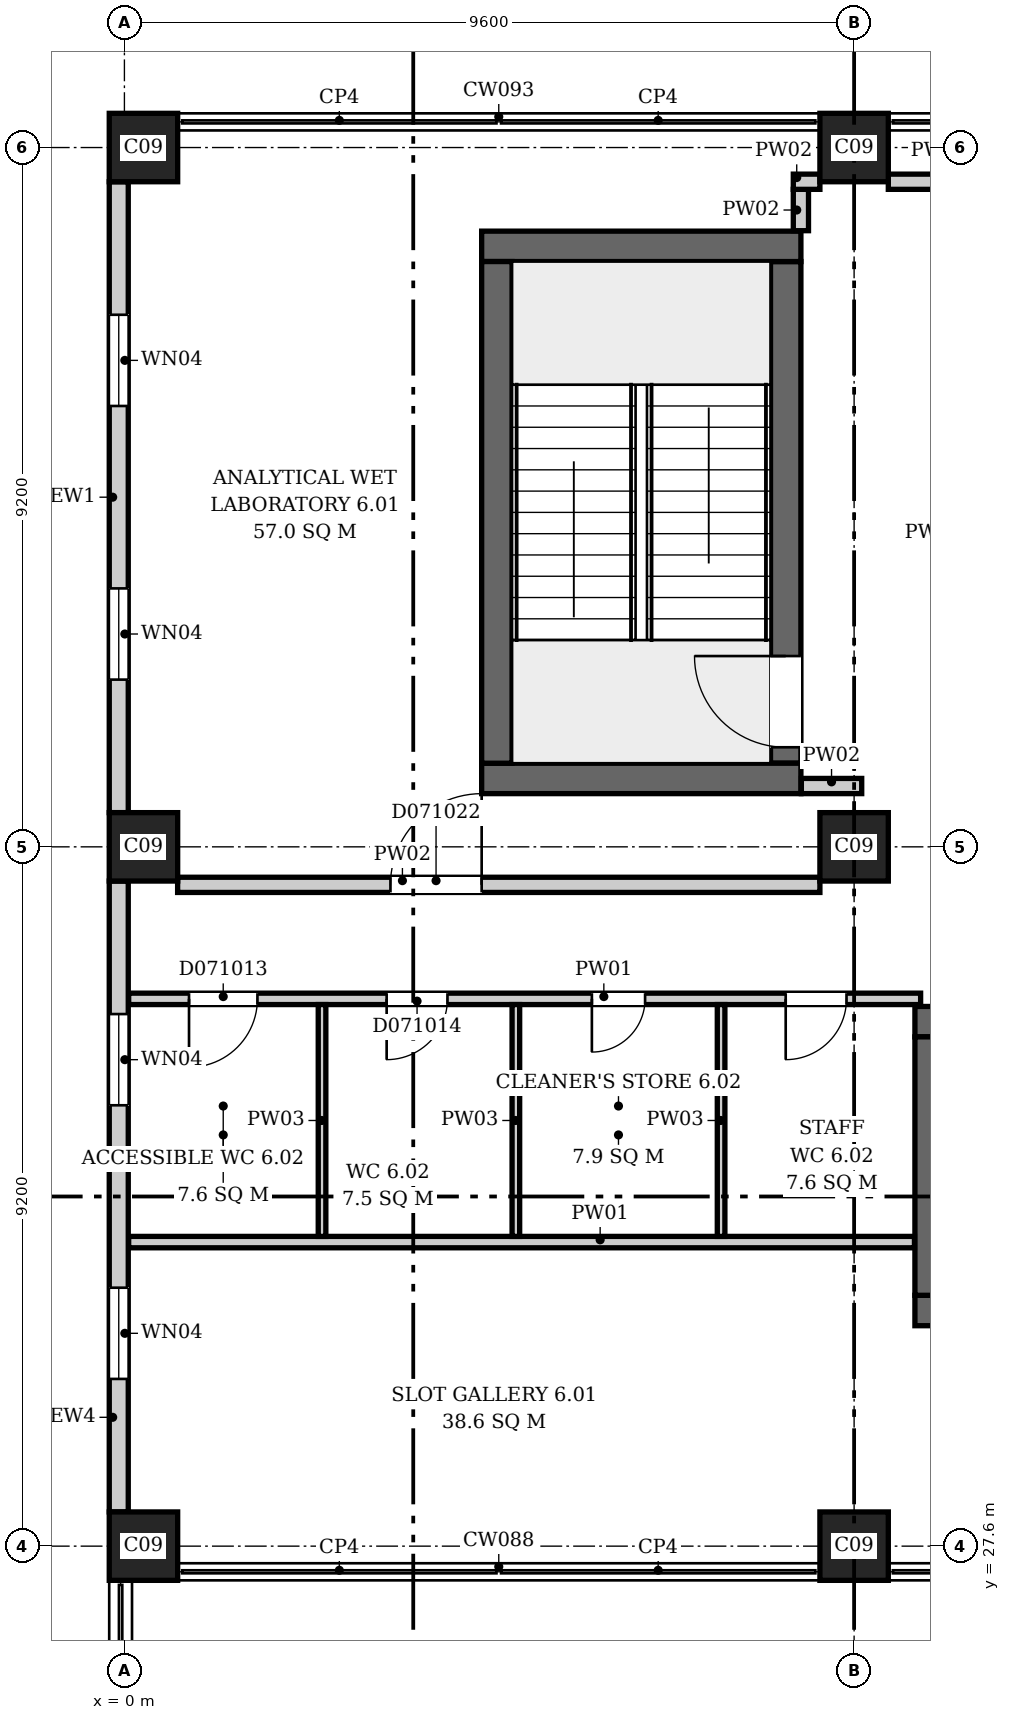
"""IFC4 building model, lengths in metres.
Left out: names, types, materials, properties, quantities, classifications, styles, units other than length and angle.
Written with IfcOpenShell. Run it as: python <this file> out.ifc"""

import sys

from ifc_helpers import new_model, si_unit, direction, frame, frame_2d, origin, origin_2d, place, context, subcontext, project, spatial, rectangle, extrude, element, fill, save


model = new_model("IFC4")
c1 = context("Model", 3, precision=1e-05, world=origin(), true_north=direction((0.0, 1.0)))
c2 = subcontext(c1, "Body", "Model", "MODEL_VIEW")
j1 = project(units=[si_unit("LENGTHUNIT", "METRE"), si_unit("PLANEANGLEUNIT", "RADIAN")], contexts=[c1])
p1 = place(None, origin())
s1 = spatial("IfcSite", under=j1, at=p1, CompositionType="ELEMENT")
p2 = place(p1, origin())
s2 = spatial("IfcBuilding", under=s1, at=p2, CompositionType="ELEMENT")
p3 = place(p2, frame((0.0, 0.0, 36.1)))
s3 = spatial("IfcBuildingStorey", under=s2, at=p3, CompositionType="ELEMENT", Elevation=36.1)
for number, where, z_axis, x_axis in (
    (1, (4.7, 37.7, 0.0), (0.0, 0.0, 1.0), (1.0, 0.0, 0.0)),
    (2, (4.7, 44.7, 0.0), (0.0, 0.0, 1.0), (1.0, 0.0, 0.0)),
):
    element("IfcWall", number, at=place(p3, frame(where, z_axis=z_axis, x_axis=x_axis)), inside=s3, PredefinedType="SHEAR", context=c2, shape_type="SweptSolid", body=[
        extrude(rectangle(XDim=4.2, YDim=0.4, at=frame_2d((2.1, 0.0))), origin(), (0.0, 0.0, 1.0), 4.2),
    ])
p4 = place(p3, frame((4.9, 37.9, 0.0), z_axis=(0.0, 0.0, 1.0), x_axis=(0.0, 1.0, 0.0)))
e3 = element("IfcWall", 3, at=p4, inside=s3, PredefinedType="SHEAR", context=c2, shape_type="SweptSolid", body=[
    extrude(rectangle(XDim=6.6, YDim=0.4, at=frame_2d((3.3, 0.0))), origin(), (0.0, 0.0, 1.0), 4.2),
])
p5 = place(p3, frame((8.7, 37.9, 0.0), z_axis=(0.0, 0.0, 1.0), x_axis=(0.0, 1.0, 0.0)))
e4 = element("IfcWall", 4, at=p5, inside=s3, PredefinedType="SHEAR", context=c2, shape_type="SweptSolid", body=[
    extrude(rectangle(XDim=6.6, YDim=0.4, at=frame_2d((3.3, 0.0))), origin(), (0.0, 0.0, 1.0), 4.2),
])
p6 = place(p5, frame((0.21, 0.0, 0.0)))
e5 = element("IfcOpeningElement", 5, at=p6, cuts=e4, PredefinedType="OPENING", context=c2, shape_type="SweptSolid", body=[
    extrude(rectangle(XDim=1.2, YDim=2.1, at=frame_2d((0.6, 1.05))), frame((0.0, 0.21, 0.0), z_axis=(0.0, -1.0, 0.0), x_axis=(1.0, 0.0, 0.0)), (0.0, 0.0, 1.0), 0.42),
])
p7 = place(p3, frame((10.4, 30.7, 0.0), z_axis=(0.0, 0.0, 1.0), x_axis=(1.0, 0.0, 0.0)))
e6 = element("IfcWall", 6, at=p7, inside=s3, PredefinedType="SHEAR", context=c2, shape_type="SweptSolid", body=[
    extrude(rectangle(XDim=3.1, YDim=0.4, at=frame_2d((1.55, 0.0))), origin(), (0.0, 0.0, 1.0), 4.2),
])
p8 = place(p7, frame((0.95, 0.0, 0.0)))
e7 = element("IfcOpeningElement", 7, at=p8, cuts=e6, PredefinedType="OPENING", context=c2, shape_type="SweptSolid", body=[
    extrude(rectangle(XDim=1.2, YDim=2.1, at=frame_2d((0.6, 1.05))), frame((0.0, 0.21, 0.0), z_axis=(0.0, -1.0, 0.0), x_axis=(1.0, 0.0, 0.0)), (0.0, 0.0, 1.0), 0.42),
])
p9 = place(p3, frame((10.4, 34.5, 0.0), z_axis=(0.0, 0.0, 1.0), x_axis=(1.0, 0.0, 0.0)))
e8 = element("IfcWall", 8, at=p9, inside=s3, PredefinedType="SHEAR", context=c2, shape_type="SweptSolid", body=[
    extrude(rectangle(XDim=3.1, YDim=0.4, at=frame_2d((1.55, 0.0))), origin(), (0.0, 0.0, 1.0), 4.2),
])
p10 = place(p3, frame((10.6, 30.9, 0.0), z_axis=(0.0, 0.0, 1.0), x_axis=(0.0, 1.0, 0.0)))
e9 = element("IfcWall", 9, at=p10, inside=s3, PredefinedType="SHEAR", context=c2, shape_type="SweptSolid", body=[
    extrude(rectangle(XDim=3.4, YDim=0.4, at=frame_2d((1.7, 0.0))), origin(), (0.0, 0.0, 1.0), 4.2),
])
for number, where, z_axis, x_axis in (
    (10, (0.25, 27.6, 0.0), (0.0, 0.0, 1.0), (1.0, 0.0, 0.0)),
    (11, (9.6, 27.6, 0.0), (0.0, 0.0, 1.0), (1.0, 0.0, 0.0)),
    (12, (0.25, 36.8, 0.0), (0.0, 0.0, 1.0), (1.0, 0.0, 0.0)),
    (13, (9.6, 36.8, 0.0), (0.0, 0.0, 1.0), (1.0, 0.0, 0.0)),
    (14, (0.25, 46.0, 0.0), (0.0, 0.0, 1.0), (1.0, 0.0, 0.0)),
    (15, (9.6, 46.0, 0.0), (0.0, 0.0, 1.0), (1.0, 0.0, 0.0)),
):
    element("IfcColumn", number, at=place(p3, frame(where, z_axis=z_axis, x_axis=x_axis)), inside=s3, PredefinedType="COLUMN", context=c2, shape_type="SweptSolid", body=[
        extrude(rectangle(XDim=0.9, YDim=0.9, at=origin_2d()), origin(), (0.0, 0.0, 1.0), 4.2),
    ])
p11 = place(p3, frame((-0.074, 36.35, 0.0), z_axis=(0.0, 0.0, 1.0), x_axis=(0.0, -1.0, 0.0)))
e16 = element("IfcWall", 16, at=p11, inside=s3, PredefinedType="ELEMENTEDWALL", context=c2, shape_type="SweptSolid", body=[
    extrude(rectangle(XDim=8.3, YDim=0.25, at=frame_2d((4.15, 0.0))), origin(), (0.0, 0.0, 1.0), 3.9),
])
p12 = place(p11, frame((5.35, 0.0, 0.9)))
e17 = element("IfcOpeningElement", 17, at=p12, cuts=e16, PredefinedType="OPENING", context=c2, shape_type="SweptSolid", body=[
    extrude(rectangle(XDim=1.2, YDim=2.6, at=frame_2d((0.6, 1.3))), frame((0.0, 0.135, 0.0), z_axis=(0.0, -1.0, 0.0), x_axis=(1.0, 0.0, 0.0)), (0.0, 0.0, 1.0), 0.27),
])
p13 = place(p11, frame((1.75, 0.0, 0.9)))
e18 = element("IfcOpeningElement", 18, at=p13, cuts=e16, PredefinedType="OPENING", context=c2, shape_type="SweptSolid", body=[
    extrude(rectangle(XDim=1.2, YDim=2.6, at=frame_2d((0.6, 1.3))), frame((0.0, 0.135, 0.0), z_axis=(0.0, -1.0, 0.0), x_axis=(1.0, 0.0, 0.0)), (0.0, 0.0, 1.0), 0.27),
])
p14 = place(p3, frame((-0.074, 45.55, 0.0), z_axis=(0.0, 0.0, 1.0), x_axis=(0.0, -1.0, 0.0)))
e19 = element("IfcWall", 19, at=p14, inside=s3, PredefinedType="ELEMENTEDWALL", context=c2, shape_type="SweptSolid", body=[
    extrude(rectangle(XDim=8.3, YDim=0.25, at=frame_2d((4.15, 0.0))), origin(), (0.0, 0.0, 1.0), 3.9),
])
p15 = place(p14, frame((5.35, 0.0, 0.9)))
e20 = element("IfcOpeningElement", 20, at=p15, cuts=e19, PredefinedType="OPENING", context=c2, shape_type="SweptSolid", body=[
    extrude(rectangle(XDim=1.2, YDim=2.6, at=frame_2d((0.6, 1.3))), frame((0.0, 0.135, 0.0), z_axis=(0.0, -1.0, 0.0), x_axis=(1.0, 0.0, 0.0)), (0.0, 0.0, 1.0), 0.27),
])
p16 = place(p14, frame((1.75, 0.0, 0.9)))
e21 = element("IfcOpeningElement", 21, at=p16, cuts=e19, PredefinedType="OPENING", context=c2, shape_type="SweptSolid", body=[
    extrude(rectangle(XDim=1.2, YDim=2.6, at=frame_2d((0.6, 1.3))), frame((0.0, 0.135, 0.0), z_axis=(0.0, -1.0, 0.0), x_axis=(1.0, 0.0, 0.0)), (0.0, 0.0, 1.0), 0.27),
])
p17 = place(p3, frame((0.056, 31.6, 0.0), z_axis=(0.0, 0.0, 1.0), x_axis=(1.0, 0.0, 0.0)))
e22 = element("IfcWall", 22, at=p17, inside=s3, PredefinedType="PARTITIONING", context=c2, shape_type="SweptSolid", body=[
    extrude(rectangle(XDim=10.338, YDim=0.15, at=frame_2d((5.169, 0.0))), origin(), (0.0, 0.0, 1.0), 3.9),
])
p18 = place(p3, frame((0.056, 34.8, 0.0), z_axis=(0.0, 0.0, 1.0), x_axis=(1.0, 0.0, 0.0)))
e23 = element("IfcWall", 23, at=p18, inside=s3, PredefinedType="PARTITIONING", context=c2, shape_type="SweptSolid", body=[
    extrude(rectangle(XDim=10.419, YDim=0.15, at=frame_2d((5.209, 0.0))), origin(), (0.0, 0.0, 1.0), 3.9),
])
p19 = place(p18, frame((0.794, 0.0, 0.0)))
e24 = element("IfcOpeningElement", 24, at=p19, cuts=e23, PredefinedType="OPENING", context=c2, shape_type="SweptSolid", body=[
    extrude(rectangle(XDim=0.9, YDim=2.1, at=frame_2d((0.45, 1.05))), frame((0.0, 0.085, 0.0), z_axis=(0.0, -1.0, 0.0), x_axis=(1.0, 0.0, 0.0)), (0.0, 0.0, 1.0), 0.17),
])
p20 = place(p18, frame((3.394, 0.0, 0.0)))
e25 = element("IfcOpeningElement", 25, at=p20, cuts=e23, PredefinedType="OPENING", context=c2, shape_type="SweptSolid", body=[
    extrude(rectangle(XDim=0.8, YDim=2.1, at=frame_2d((0.4, 1.05))), frame((0.0, 0.085, 0.0), z_axis=(0.0, -1.0, 0.0), x_axis=(1.0, 0.0, 0.0)), (0.0, 0.0, 1.0), 0.17),
])
p21 = place(p18, frame((6.094, 0.0, 0.0)))
e26 = element("IfcOpeningElement", 26, at=p21, cuts=e23, PredefinedType="OPENING", context=c2, shape_type="SweptSolid", body=[
    extrude(rectangle(XDim=0.7, YDim=2.1, at=frame_2d((0.35, 1.05))), frame((0.0, 0.085, 0.0), z_axis=(0.0, -1.0, 0.0), x_axis=(1.0, 0.0, 0.0)), (0.0, 0.0, 1.0), 0.17),
])
p22 = place(p18, frame((8.644, 0.0, 0.0)))
e27 = element("IfcOpeningElement", 27, at=p22, cuts=e23, PredefinedType="OPENING", context=c2, shape_type="SweptSolid", body=[
    extrude(rectangle(XDim=0.8, YDim=2.1, at=frame_2d((0.4, 1.05))), frame((0.0, 0.085, 0.0), z_axis=(0.0, -1.0, 0.0), x_axis=(1.0, 0.0, 0.0)), (0.0, 0.0, 1.0), 0.17),
])
p23 = place(p3, frame((0.7, 36.3, 0.0), z_axis=(0.0, 0.0, 1.0), x_axis=(1.0, 0.0, 0.0)))
e28 = element("IfcWall", 28, at=p23, inside=s3, PredefinedType="PARTITIONING", context=c2, shape_type="SweptSolid", body=[
    extrude(rectangle(XDim=8.45, YDim=0.2, at=frame_2d((4.225, 0.0))), origin(), (0.0, 0.0, 1.0), 3.9),
])
p24 = place(p23, frame((2.8, 0.0, 0.0)))
e29 = element("IfcOpeningElement", 29, at=p24, cuts=e28, PredefinedType="OPENING", context=c2, shape_type="SweptSolid", body=[
    extrude(rectangle(XDim=1.2, YDim=2.1, at=frame_2d((0.6, 1.05))), frame((0.0, 0.11, 0.0), z_axis=(0.0, -1.0, 0.0), x_axis=(1.0, 0.0, 0.0)), (0.0, 0.0, 1.0), 0.22),
])
for number, where, z_axis, x_axis in (
    (30, (2.6, 31.675, 0.0), (0.0, 0.0, 1.0), (0.0, 1.0, 0.0)),
    (31, (5.15, 31.675, 0.0), (0.0, 0.0, 1.0), (0.0, 1.0, 0.0)),
    (32, (7.85, 31.675, 0.0), (0.0, 0.0, 1.0), (0.0, 1.0, 0.0)),
):
    element("IfcWall", number, at=place(p3, frame(where, z_axis=z_axis, x_axis=x_axis)), inside=s3, PredefinedType="PARTITIONING", context=c2, shape_type="SweptSolid", body=[
        extrude(rectangle(XDim=3.05, YDim=0.1, at=frame_2d((1.525, 0.0))), origin(), (0.0, 0.0, 1.0), 3.9),
    ])
p25 = place(p3, frame((8.9, 44.906, 0.0), z_axis=(0.0, 0.0, 1.0), x_axis=(0.0, 1.0, 0.0)))
e33 = element("IfcWall", 33, at=p25, inside=s3, PredefinedType="PARTITIONING", context=c2, shape_type="SweptSolid", body=[
    extrude(rectangle(XDim=0.544, YDim=0.2, at=frame_2d((0.272, 0.0))), origin(), (0.0, 0.0, 1.0), 3.9),
])
p26 = place(p3, frame((8.8, 45.55, 0.0), z_axis=(0.0, 0.0, 1.0), x_axis=(1.0, 0.0, 0.0)))
e34 = element("IfcWall", 34, at=p26, inside=s3, PredefinedType="PARTITIONING", context=c2, shape_type="SweptSolid", body=[
    extrude(rectangle(XDim=0.35, YDim=0.2, at=frame_2d((0.175, 0.0))), origin(), (0.0, 0.0, 1.0), 3.9),
])
p27 = place(p3, frame((8.906, 37.6, 0.0), z_axis=(0.0, 0.0, 1.0), x_axis=(1.0, 0.0, 0.0)))
e35 = element("IfcWall", 35, at=p27, inside=s3, PredefinedType="PARTITIONING", context=c2, shape_type="SweptSolid", body=[
    extrude(rectangle(XDim=0.794, YDim=0.2, at=frame_2d((0.397, 0.0))), origin(), (0.0, 0.0, 1.0), 3.9),
])
p28 = place(p3, frame((10.05, 45.55, 0.0), z_axis=(0.0, 0.0, 1.0), x_axis=(1.0, 0.0, 0.0)))
e36 = element("IfcWall", 36, at=p28, inside=s3, PredefinedType="PARTITIONING", context=c2, shape_type="SweptSolid", body=[
    extrude(rectangle(XDim=1.35, YDim=0.2, at=frame_2d((0.675, 0.0))), origin(), (0.0, 0.0, 1.0), 3.9),
])
p29 = place(p12, origin())
e37 = element("IfcWindow", 37, at=p29, inside=s3, PartitioningType="SINGLE_PANEL", PredefinedType="WINDOW", context=c2, shape_type="SweptSolid", body=[
    extrude(rectangle(XDim=1.2, YDim=2.6, at=frame_2d((0.6, 1.3))), frame((0.0, 0.03, 0.0), z_axis=(0.0, -1.0, 0.0), x_axis=(1.0, 0.0, 0.0)), (0.0, 0.0, 1.0), 0.06),
])
fill(e17, e37)
p30 = place(p13, origin())
e38 = element("IfcWindow", 38, at=p30, inside=s3, PartitioningType="SINGLE_PANEL", PredefinedType="WINDOW", context=c2, shape_type="SweptSolid", body=[
    extrude(rectangle(XDim=1.2, YDim=2.6, at=frame_2d((0.6, 1.3))), frame((0.0, 0.03, 0.0), z_axis=(0.0, -1.0, 0.0), x_axis=(1.0, 0.0, 0.0)), (0.0, 0.0, 1.0), 0.06),
])
fill(e18, e38)
p31 = place(p15, origin())
e39 = element("IfcWindow", 39, at=p31, inside=s3, PartitioningType="SINGLE_PANEL", PredefinedType="WINDOW", context=c2, shape_type="SweptSolid", body=[
    extrude(rectangle(XDim=1.2, YDim=2.6, at=frame_2d((0.6, 1.3))), frame((0.0, 0.03, 0.0), z_axis=(0.0, -1.0, 0.0), x_axis=(1.0, 0.0, 0.0)), (0.0, 0.0, 1.0), 0.06),
])
fill(e20, e39)
p32 = place(p16, origin())
e40 = element("IfcWindow", 40, at=p32, inside=s3, PartitioningType="SINGLE_PANEL", PredefinedType="WINDOW", context=c2, shape_type="SweptSolid", body=[
    extrude(rectangle(XDim=1.2, YDim=2.6, at=frame_2d((0.6, 1.3))), frame((0.0, 0.03, 0.0), z_axis=(0.0, -1.0, 0.0), x_axis=(1.0, 0.0, 0.0)), (0.0, 0.0, 1.0), 0.06),
])
fill(e21, e40)
p33 = place(p6, origin())
e41 = element("IfcDoor", 41, at=p33, inside=s3, OperationType="SINGLE_SWING_RIGHT", PredefinedType="DOOR", context=c2, shape_type="SweptSolid", body=[
    extrude(rectangle(XDim=1.2, YDim=2.1, at=frame_2d((0.6, 1.05))), frame((0.0, 0.025, 0.0), z_axis=(0.0, -1.0, 0.0), x_axis=(1.0, 0.0, 0.0)), (0.0, 0.0, 1.0), 0.05),
])
fill(e5, e41)
p34 = place(p19, origin())
e42 = element("IfcDoor", 42, at=p34, inside=s3, OperationType="SINGLE_SWING_LEFT", PredefinedType="DOOR", context=c2, shape_type="SweptSolid", body=[
    extrude(rectangle(XDim=0.9, YDim=2.1, at=frame_2d((0.45, 1.05))), frame((0.0, 0.025, 0.0), z_axis=(0.0, -1.0, 0.0), x_axis=(1.0, 0.0, 0.0)), (0.0, 0.0, 1.0), 0.05),
])
fill(e24, e42)
p35 = place(p20, origin())
e43 = element("IfcDoor", 43, at=p35, inside=s3, OperationType="SINGLE_SWING_LEFT", PredefinedType="DOOR", context=c2, shape_type="SweptSolid", body=[
    extrude(rectangle(XDim=0.8, YDim=2.1, at=frame_2d((0.4, 1.05))), frame((0.0, 0.025, 0.0), z_axis=(0.0, -1.0, 0.0), x_axis=(1.0, 0.0, 0.0)), (0.0, 0.0, 1.0), 0.05),
])
fill(e25, e43)
p36 = place(p21, origin())
e44 = element("IfcDoor", 44, at=p36, inside=s3, OperationType="SINGLE_SWING_LEFT", PredefinedType="DOOR", context=c2, shape_type="SweptSolid", body=[
    extrude(rectangle(XDim=0.7, YDim=2.1, at=frame_2d((0.35, 1.05))), frame((0.0, 0.025, 0.0), z_axis=(0.0, -1.0, 0.0), x_axis=(1.0, 0.0, 0.0)), (0.0, 0.0, 1.0), 0.05),
])
fill(e26, e44)
p37 = place(p22, origin())
e45 = element("IfcDoor", 45, at=p37, inside=s3, OperationType="SINGLE_SWING_LEFT", PredefinedType="DOOR", context=c2, shape_type="SweptSolid", body=[
    extrude(rectangle(XDim=0.8, YDim=2.1, at=frame_2d((0.4, 1.05))), frame((0.0, 0.025, 0.0), z_axis=(0.0, -1.0, 0.0), x_axis=(1.0, 0.0, 0.0)), (0.0, 0.0, 1.0), 0.05),
])
fill(e27, e45)
p38 = place(p24, origin())
e46 = element("IfcDoor", 46, at=p38, inside=s3, OperationType="SINGLE_SWING_RIGHT", PredefinedType="DOOR", context=c2, shape_type="SweptSolid", body=[
    extrude(rectangle(XDim=1.2, YDim=2.1, at=frame_2d((0.6, 1.05))), frame((0.0, 0.025, 0.0), z_axis=(0.0, -1.0, 0.0), x_axis=(1.0, 0.0, 0.0)), (0.0, 0.0, 1.0), 0.05),
])
fill(e29, e46)
save(model, sys.argv[1])
